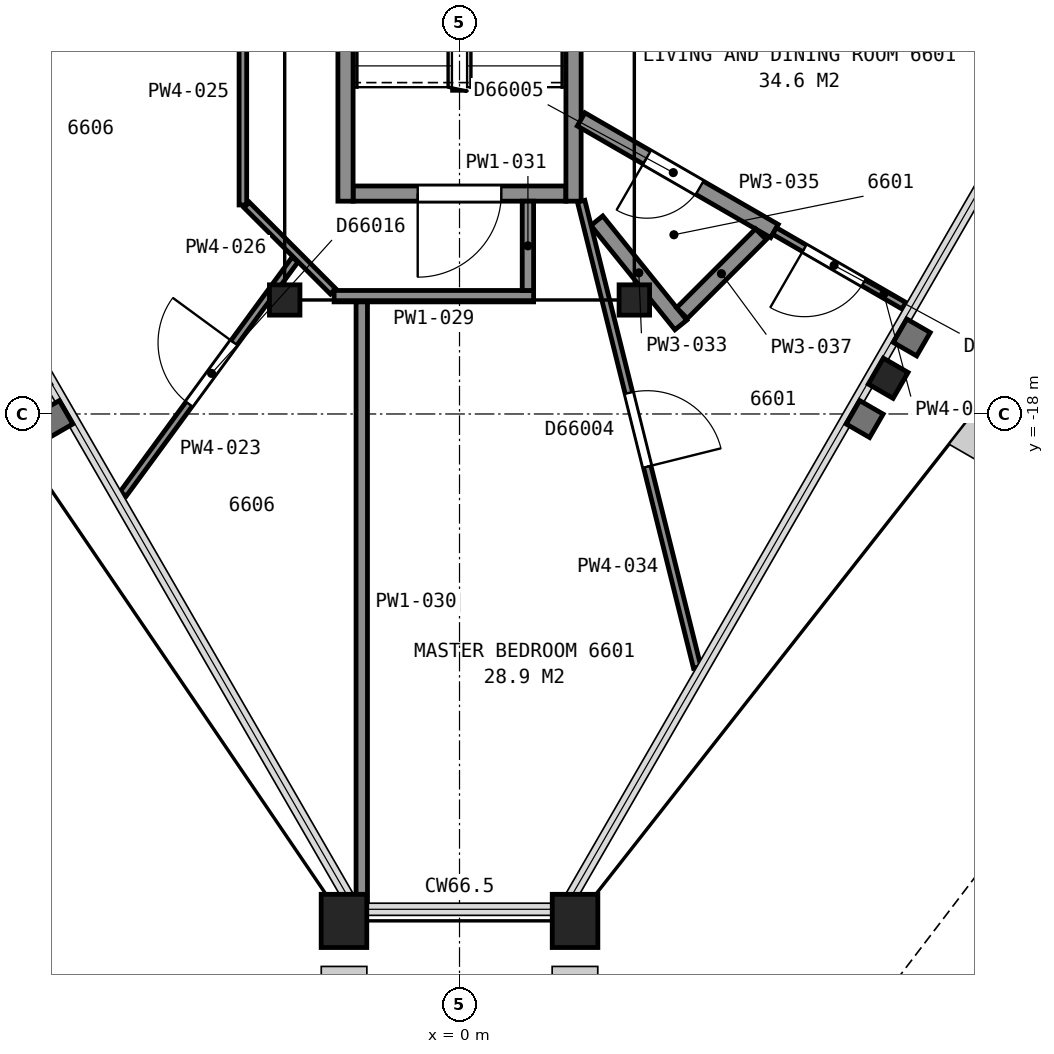
"""IFC4 building model, lengths in metres.
Left out: names, types, materials, properties, quantities, classifications, styles, units other than length and angle.
Written with IfcOpenShell. Run it as: python <this file> out.ifc"""

import sys

from ifc_helpers import new_model, si_unit, direction, frame, frame_2d, origin, origin_2d, place, context, subcontext, project, spatial, rectangle, hollow_rectangle, i_section, extrude, element, fill, save


model = new_model("IFC4")
c1 = context("Model", 3, precision=1e-05, world=origin(), true_north=direction((0.0, 1.0)))
c2 = subcontext(c1, "Body", "Model", "MODEL_VIEW")
j1 = project(units=[si_unit("LENGTHUNIT", "METRE"), si_unit("PLANEANGLEUNIT", "RADIAN")], contexts=[c1])
p1 = place(None, origin())
s1 = spatial("IfcSite", under=j1, at=p1, CompositionType="ELEMENT")
p2 = place(p1, origin())
s2 = spatial("IfcBuilding", under=s1, at=p2, CompositionType="ELEMENT")
p3 = place(p2, frame((0.0, 0.0, 264.0)))
s3 = spatial("IfcBuildingStorey", under=s2, at=p3, CompositionType="ELEMENT", Elevation=264.0)
for number, where, z_axis, x_axis in (
    (1, (-1.52, -24.67, 0.0), (0.0, 0.0, 1.0), (-1.0, 0.0, 0.0)),
    (2, (1.52, -24.67, 0.0), (0.0, 0.0, 1.0), (-1.0, 0.0, 0.0)),
):
    element("IfcColumn", number, at=place(p3, frame(where, z_axis=z_axis, x_axis=x_axis)), inside=s3, PredefinedType="COLUMN", context=c2, shape_type="SweptSolid", body=[
        extrude(hollow_rectangle(XDim=0.6, YDim=0.7, WallThickness=0.04, at=origin_2d()), origin(), (0.0, 0.0, 1.0), 3.7),
    ])
p4 = place(p3, frame((5.64, -17.53, 0.0), z_axis=(0.0, 0.0, 1.0), x_axis=(-0.5, -0.866025403784, 0.0)))
e3 = element("IfcColumn", 3, at=p4, inside=s3, PredefinedType="COLUMN", context=c2, shape_type="SweptSolid", body=[
    extrude(i_section(OverallWidth=0.394, OverallDepth=0.376, WebThickness=0.017, FlangeThickness=0.028, FilletRadius=0.015, at=origin_2d()), origin(), (0.0, 0.0, 1.0), 3.7),
])
for number, where, z_axis, x_axis in (
    (4, (-2.3, -16.5, 0.05), (0.0, 0.0, 1.0), (-1.0, 0.0, 0.0)),
    (5, (2.3, -16.5, 0.05), (0.0, 0.0, 1.0), (-1.0, 0.0, 0.0)),
):
    element("IfcColumn", number, at=place(p3, frame(where, z_axis=z_axis, x_axis=x_axis)), inside=s3, PredefinedType="COLUMN", context=c2, shape_type="SweptSolid", body=[
        extrude(i_section(OverallWidth=0.401, OverallDepth=0.399, WebThickness=0.025, FlangeThickness=0.04, FilletRadius=0.015, at=origin_2d()), origin(), (0.0, 0.0, 1.0), 3.65),
    ])
p5 = place(p3, frame((-1.4, -15.1, 0.0), z_axis=(0.0, 0.0, 1.0), x_axis=(1.0, 0.0, 0.0)))
e6 = element("IfcWall", 6, at=p5, inside=s3, PredefinedType="PARTITIONING", context=c2, shape_type="SweptSolid", body=[
    extrude(rectangle(XDim=2.8, YDim=0.2, at=frame_2d((1.4, 0.0))), origin(), (0.0, 0.0, 1.0), 3.45),
])
p6 = place(p5, frame((0.85, 0.0, 0.0)))
e7 = element("IfcOpeningElement", 7, at=p6, cuts=e6, PredefinedType="OPENING", context=c2, shape_type="SweptSolid", body=[
    extrude(rectangle(XDim=1.1, YDim=2.1, at=frame_2d((0.55, 1.05))), frame((0.0, 0.11, 0.0), z_axis=(0.0, -1.0, 0.0), x_axis=(1.0, 0.0, 0.0)), (0.0, 0.0, 1.0), 0.22),
])
for number, where, z_axis, x_axis in (
    (8, (1.5, -8.0, 0.0), (0.0, 0.0, 1.0), (0.0, -1.0, 0.0)),
    (9, (-1.5, -8.0, 0.0), (0.0, 0.0, 1.0), (0.0, -1.0, 0.0)),
):
    element("IfcWall", number, at=place(p3, frame(where, z_axis=z_axis, x_axis=x_axis)), inside=s3, PredefinedType="PARTITIONING", context=c2, shape_type="SweptSolid", body=[
        extrude(rectangle(XDim=7.2, YDim=0.2, at=frame_2d((3.6, 0.0))), origin(), (0.0, 0.0, 1.0), 3.45),
    ])
p7 = place(p3, frame((-2.164, -15.968, 0.0), z_axis=(0.0, 0.0, 1.0), x_axis=(-0.591435630084, -0.806352215516, 0.0)))
e10 = element("IfcWall", 10, at=p7, inside=s3, PredefinedType="PARTITIONING", context=c2, shape_type="SweptSolid", body=[
    extrude(rectangle(XDim=3.824, YDim=0.1, at=frame_2d((1.912, 0.0))), origin(), (0.0, 0.0, 1.0), 2.723),
])
p8 = place(p7, frame((1.358, 0.0, 0.0)))
e11 = element("IfcOpeningElement", 11, at=p8, cuts=e10, PredefinedType="OPENING", context=c2, shape_type="SweptSolid", body=[
    extrude(rectangle(XDim=1.0, YDim=2.1, at=frame_2d((0.5, 1.05))), frame((0.0, 0.06, 0.0), z_axis=(0.0, -1.0, 0.0), x_axis=(1.0, 0.0, 0.0)), (0.0, 0.0, 1.0), 0.12),
])
p9 = place(p3, frame((-2.85, -15.25, 0.0), z_axis=(0.0, 0.0, 1.0), x_axis=(0.0, 1.0, 0.0)))
e12 = element("IfcWall", 12, at=p9, inside=s3, PredefinedType="PARTITIONING", context=c2, shape_type="SweptSolid", body=[
    extrude(rectangle(XDim=2.961, YDim=0.1, at=frame_2d((1.48, 0.0))), origin(), (0.0, 0.0, 1.0), 2.723),
])
p10 = place(p3, frame((-2.801, -15.25, 0.0), z_axis=(0.0, 0.0, 1.0), x_axis=(0.707106781187, -0.707106781187, 0.0)))
e13 = element("IfcWall", 13, at=p10, inside=s3, PredefinedType="PARTITIONING", context=c2, shape_type="SweptSolid", body=[
    extrude(rectangle(XDim=1.608, YDim=0.1, at=frame_2d((0.804, 0.0))), origin(), (0.0, 0.0, 1.0), 2.723),
])
p11 = place(p3, frame((-1.65, -16.45, 0.0), z_axis=(0.0, 0.0, 1.0), x_axis=(1.0, 0.0, 0.0)))
e14 = element("IfcWall", 14, at=p11, inside=s3, PredefinedType="PARTITIONING", context=c2, shape_type="SweptSolid", body=[
    extrude(rectangle(XDim=2.625, YDim=0.15, at=frame_2d((1.312, 0.0))), origin(), (0.0, 0.0, 1.0), 2.723),
])
p12 = place(p3, frame((-1.286, -24.421, 0.0), z_axis=(0.0, 0.0, 1.0), x_axis=(0.0, 1.0, 0.0)))
e15 = element("IfcWall", 15, at=p12, inside=s3, PredefinedType="PARTITIONING", context=c2, shape_type="SweptSolid", body=[
    extrude(rectangle(XDim=7.896, YDim=0.15, at=frame_2d((3.948, 0.0))), origin(), (0.0, 0.0, 1.0), 2.723),
])
p13 = place(p3, frame((0.9, -16.375, 0.0), z_axis=(0.0, 0.0, 1.0), x_axis=(0.0, 1.0, 0.0)))
e16 = element("IfcWall", 16, at=p13, inside=s3, PredefinedType="PARTITIONING", context=c2, shape_type="SweptSolid", body=[
    extrude(rectangle(XDim=1.175, YDim=0.15, at=frame_2d((0.587, 0.0))), origin(), (0.0, 0.0, 1.0), 2.723),
])
p14 = place(p3, frame((1.807, -15.457, 0.0), z_axis=(0.0, 0.0, 1.0), x_axis=(0.62721044395, -0.778849830841, 0.0)))
e17 = element("IfcWall", 17, at=p14, inside=s3, PredefinedType="PARTITIONING", context=c2, shape_type="SweptSolid", body=[
    extrude(rectangle(XDim=1.761, YDim=0.2, at=frame_2d((0.881, 0.0))), origin(), (0.0, 0.0, 1.0), 2.723),
])
p15 = place(p3, frame((3.127, -21.335, 0.0), z_axis=(0.0, 0.0, 1.0), x_axis=(-0.241554155251, 0.970387340231, 0.0)))
e18 = element("IfcWall", 18, at=p15, inside=s3, PredefinedType="PARTITIONING", context=c2, shape_type="SweptSolid", body=[
    extrude(rectangle(XDim=6.322, YDim=0.1, at=frame_2d((3.161, 0.0))), origin(), (0.0, 0.0, 1.0), 2.723),
])
p16 = place(p15, frame((2.722, 0.0, 0.0)))
e19 = element("IfcOpeningElement", 19, at=p16, cuts=e18, PredefinedType="OPENING", context=c2, shape_type="SweptSolid", body=[
    extrude(rectangle(XDim=1.0, YDim=2.1, at=frame_2d((0.5, 1.05))), frame((0.0, 0.06, 0.0), z_axis=(0.0, -1.0, 0.0), x_axis=(1.0, 0.0, 0.0)), (0.0, 0.0, 1.0), 0.12),
])
p17 = place(p3, frame((4.144, -15.593, 0.0), z_axis=(0.0, 0.0, 1.0), x_axis=(-0.865947474014, 0.500134954036, 0.0)))
e20 = element("IfcWall", 20, at=p17, inside=s3, PredefinedType="PARTITIONING", context=c2, shape_type="SweptSolid", body=[
    extrude(rectangle(XDim=2.937, YDim=0.2, at=frame_2d((1.469, 0.0))), origin(), (0.0, 0.0, 1.0), 2.723),
])
p18 = place(p17, frame((1.137, 0.0, 0.0)))
e21 = element("IfcOpeningElement", 21, at=p18, cuts=e20, PredefinedType="OPENING", context=c2, shape_type="SweptSolid", body=[
    extrude(rectangle(XDim=0.8, YDim=2.1, at=frame_2d((0.4, 1.05))), frame((0.0, 0.11, 0.0), z_axis=(0.0, -1.0, 0.0), x_axis=(1.0, 0.0, 0.0)), (0.0, 0.0, 1.0), 0.22),
])
p19 = place(p3, frame((2.927, -16.673, 0.0), z_axis=(0.0, 0.0, 1.0), x_axis=(0.707106781187, 0.707106781187, 0.0)))
e22 = element("IfcWall", 22, at=p19, inside=s3, PredefinedType="PARTITIONING", context=c2, shape_type="SweptSolid", body=[
    extrude(rectangle(XDim=1.469, YDim=0.2, at=frame_2d((0.734, 0.0))), origin(), (0.0, 0.0, 1.0), 2.723),
])
p20 = place(p3, frame((5.847, -16.575, 0.0), z_axis=(0.0, 0.0, 1.0), x_axis=(-0.866156637233, 0.499772628079, 0.0)))
e23 = element("IfcWall", 23, at=p20, inside=s3, PredefinedType="PARTITIONING", context=c2, shape_type="SweptSolid", body=[
    extrude(rectangle(XDim=1.966, YDim=0.1, at=frame_2d((0.983, 0.0))), origin(), (0.0, 0.0, 1.0), 2.723),
])
p21 = place(p20, frame((0.611, 0.0, 0.0)))
e24 = element("IfcOpeningElement", 24, at=p21, cuts=e23, PredefinedType="OPENING", context=c2, shape_type="SweptSolid", body=[
    extrude(rectangle(XDim=0.9, YDim=2.1, at=frame_2d((0.45, 1.05))), frame((0.0, 0.06, 0.0), z_axis=(0.0, -1.0, 0.0), x_axis=(1.0, 0.0, 0.0)), (0.0, 0.0, 1.0), 0.12),
])
p22 = place(p6, origin())
e25 = element("IfcDoor", 25, at=p22, inside=s3, OperationType="SINGLE_SWING_LEFT", PredefinedType="DOOR", context=c2, shape_type="SweptSolid", body=[
    extrude(rectangle(XDim=1.1, YDim=2.1, at=frame_2d((0.55, 1.05))), frame((0.0, 0.025, 0.0), z_axis=(0.0, -1.0, 0.0), x_axis=(1.0, 0.0, 0.0)), (0.0, 0.0, 1.0), 0.05),
])
fill(e7, e25)
p23 = place(p8, origin())
e26 = element("IfcDoor", 26, at=p23, inside=s3, OperationType="SINGLE_SWING_LEFT", PredefinedType="DOOR", context=c2, shape_type="SweptSolid", body=[
    extrude(rectangle(XDim=1.0, YDim=2.1, at=frame_2d((0.5, 1.05))), frame((0.0, 0.025, 0.0), z_axis=(0.0, -1.0, 0.0), x_axis=(1.0, 0.0, 0.0)), (0.0, 0.0, 1.0), 0.05),
])
fill(e11, e26)
p24 = place(p16, origin())
e27 = element("IfcDoor", 27, at=p24, inside=s3, OperationType="SINGLE_SWING_LEFT", PredefinedType="DOOR", context=c2, shape_type="SweptSolid", body=[
    extrude(rectangle(XDim=1.0, YDim=2.1, at=frame_2d((0.5, 1.05))), frame((0.0, 0.025, 0.0), z_axis=(0.0, -1.0, 0.0), x_axis=(1.0, 0.0, 0.0)), (0.0, 0.0, 1.0), 0.05),
])
fill(e19, e27)
p25 = place(p18, origin())
e28 = element("IfcDoor", 28, at=p25, inside=s3, OperationType="SINGLE_SWING_RIGHT", PredefinedType="DOOR", context=c2, shape_type="SweptSolid", body=[
    extrude(rectangle(XDim=0.8, YDim=2.1, at=frame_2d((0.4, 1.05))), frame((0.0, 0.025, 0.0), z_axis=(0.0, -1.0, 0.0), x_axis=(1.0, 0.0, 0.0)), (0.0, 0.0, 1.0), 0.05),
])
fill(e21, e28)
p26 = place(p21, origin())
e29 = element("IfcDoor", 29, at=p26, inside=s3, OperationType="SINGLE_SWING_RIGHT", PredefinedType="DOOR", context=c2, shape_type="SweptSolid", body=[
    extrude(rectangle(XDim=0.9, YDim=2.1, at=frame_2d((0.45, 1.05))), frame((0.0, 0.025, 0.0), z_axis=(0.0, -1.0, 0.0), x_axis=(1.0, 0.0, 0.0)), (0.0, 0.0, 1.0), 0.05),
])
fill(e24, e29)
save(model, sys.argv[1])
